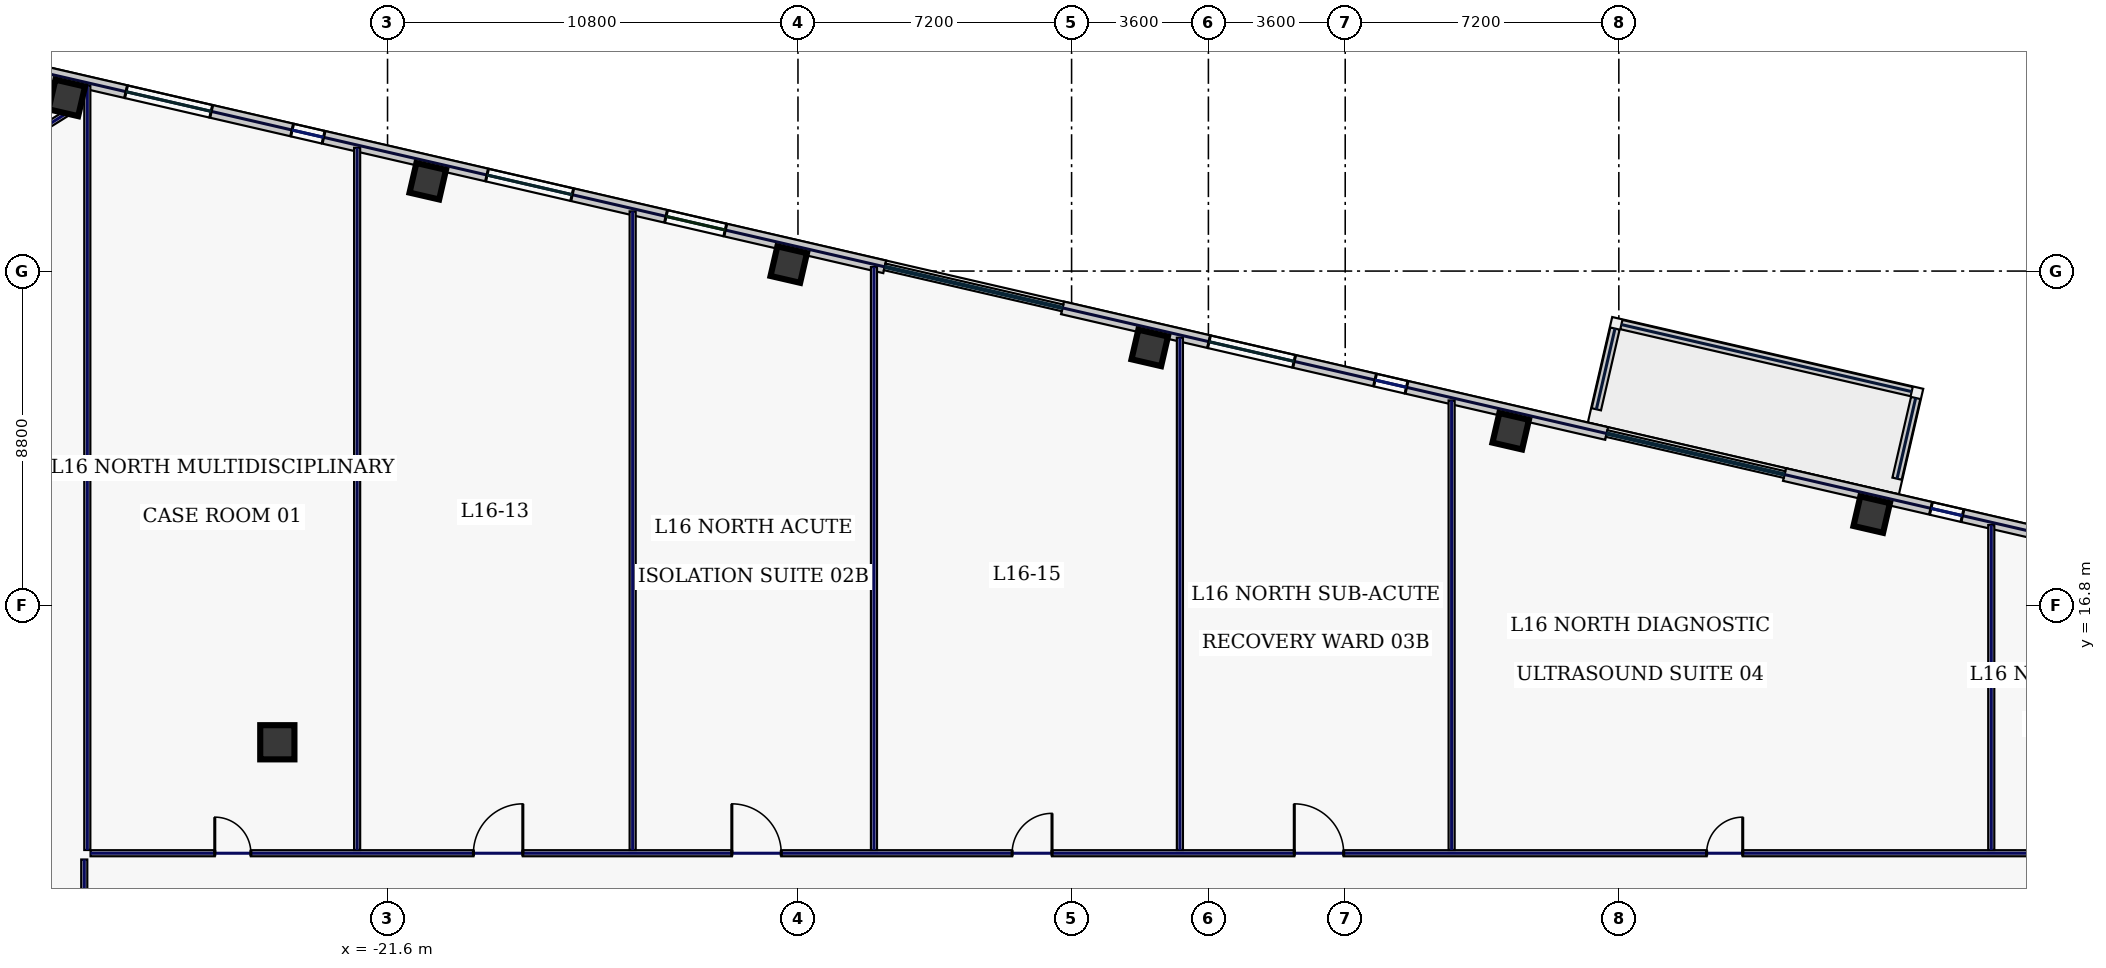
"""IFC4 building model, lengths in metres.
Left out: names, types, materials, properties, quantities, classifications, styles, units other than length and angle.
Written with IfcOpenShell. Run it as: python <this file> out.ifc"""

import sys

from ifc_helpers import new_model, si_unit, direction, frame, frame_2d, origin, origin_2d, place, context, subcontext, project, spatial, rectangle, hollow_rectangle, extrude, element, fill, save


model = new_model("IFC4")
c1 = context("Model", 3, precision=1e-05, world=origin(), true_north=direction((0.0, 1.0)))
c2 = subcontext(c1, "Body", "Model", "MODEL_VIEW")
j1 = project(units=[si_unit("LENGTHUNIT", "METRE"), si_unit("PLANEANGLEUNIT", "RADIAN")], contexts=[c1])
p1 = place(None, origin())
s1 = spatial("IfcSite", under=j1, at=p1, CompositionType="ELEMENT")
p2 = place(p1, origin())
s2 = spatial("IfcBuilding", under=s1, at=p2, CompositionType="ELEMENT")
p3 = place(p2, frame((0.0, 0.0, 75.4)))
s3 = spatial("IfcBuildingStorey", under=s2, at=p3, CompositionType="ELEMENT", Elevation=75.4)
p4 = place(p3, frame((-24.5, 13.2, 0.0), z_axis=(0.0, 0.0, 1.0), x_axis=(1.0, 0.0, 0.0)))
e1 = element("IfcColumn", 1, at=p4, inside=s3, PredefinedType="COLUMN", context=c2, shape_type="SweptSolid", body=[
    extrude(hollow_rectangle(XDim=0.9, YDim=0.9, WallThickness=0.04, at=origin_2d()), origin(), (0.0, 0.0, 1.0), 3.74),
])
for number, where, z_axis, x_axis in (
    (2, (17.454, 19.192, 0.0), (0.0, 0.0, 1.0), (0.974, -0.225, 0.0)),
    (3, (7.955, 21.385, 0.0), (0.0, 0.0, 1.0), (0.974, -0.225, 0.0)),
    (4, (-1.544, 23.578, 0.0), (0.0, 0.0, 1.0), (0.974, -0.225, 0.0)),
    (5, (-11.042, 25.771, 0.0), (0.0, 0.0, 1.0), (0.974, -0.225, 0.0)),
    (6, (-20.541, 27.964, 0.0), (0.0, 0.0, 1.0), (0.974, -0.225, 0.0)),
    (7, (-30.04, 30.156, 0.0), (0.0, 0.0, 1.0), (0.974, -0.225, 0.0)),
):
    element("IfcColumn", number, at=place(p3, frame(where, z_axis=z_axis, x_axis=x_axis)), inside=s3, PredefinedType="COLUMN", context=c2, shape_type="SweptSolid", body=[
        extrude(hollow_rectangle(XDim=0.8, YDim=0.8, WallThickness=0.036, at=origin_2d()), origin(), (0.0, 0.0, 1.0), 3.74),
    ])
p5 = place(p3, frame((10.208, 21.963, 0.0), z_axis=(0.0, 0.0, 1.0), x_axis=(0.224974004698, 0.974364765994, 0.0)))
e8 = element("IfcWall", 8, at=p5, inside=s3, PredefinedType="PARAPET", context=c2, shape_type="SweptSolid", body=[
    extrude(rectangle(XDim=2.18, YDim=0.25, at=frame_2d((1.09, 0.0))), origin(), (0.0, 0.0, 1.0), 1.15),
])
p6 = place(p3, frame((10.867, 24.192, 0.0), z_axis=(0.0, 0.0, 1.0), x_axis=(0.974362322181, -0.224984588615, 0.0)))
e9 = element("IfcWall", 9, at=p6, inside=s3, PredefinedType="PARAPET", context=c2, shape_type="SweptSolid", body=[
    extrude(rectangle(XDim=7.84, YDim=0.25, at=frame_2d((3.92, 0.0))), origin(), (0.0, 0.0, 1.0), 1.15),
])
p7 = place(p3, frame((18.611, 22.26, 0.0), z_axis=(0.0, 0.0, 1.0), x_axis=(-0.224867685436, -0.974389308258, 0.0)))
e10 = element("IfcWall", 10, at=p7, inside=s3, PredefinedType="PARAPET", context=c2, shape_type="SweptSolid", body=[
    extrude(rectangle(XDim=2.18, YDim=0.25, at=frame_2d((1.09, 0.0))), origin(), (0.0, 0.0, 1.0), 1.15),
])
p8 = place(p3, frame((37.229, 15.15, 0.0), z_axis=(0.0, 0.0, 1.0), x_axis=(-0.97436993772, 0.224951604723, 0.0)))
e11 = element("IfcWall", 11, at=p8, inside=s3, PredefinedType="STANDARD", context=c2, shape_type="SweptSolid", body=[
    extrude(rectangle(XDim=22.651, YDim=0.34, at=frame_2d((11.326, 0.0))), origin(), (0.0, 0.0, 1.0), 3.74),
])
p9 = place(p8, frame((17.845, 0.0, 0.77)))
e12 = element("IfcOpeningElement", 12, at=p9, cuts=e11, PredefinedType="OPENING", context=c2, shape_type="SweptSolid", body=[
    extrude(rectangle(XDim=0.85, YDim=1.85, at=frame_2d((0.425, 0.925))), frame((0.0, 0.18, 0.0), z_axis=(0.0, -1.0, 0.0), x_axis=(1.0, 0.0, 0.0)), (0.0, 0.0, 1.0), 0.36),
])
p10 = place(p8, frame((11.911, 0.0, 0.77)))
e13 = element("IfcOpeningElement", 13, at=p10, cuts=e11, PredefinedType="OPENING", context=c2, shape_type="SweptSolid", body=[
    extrude(rectangle(XDim=2.3, YDim=2.1, at=frame_2d((1.15, 1.05))), frame((0.0, 0.18, 0.0), z_axis=(0.0, -1.0, 0.0), x_axis=(1.0, 0.0, 0.0)), (0.0, 0.0, 1.0), 0.36),
])
p11 = place(p8, frame((2.162, 0.0, 0.77)))
e14 = element("IfcOpeningElement", 14, at=p11, cuts=e11, PredefinedType="OPENING", context=c2, shape_type="SweptSolid", body=[
    extrude(rectangle(XDim=2.3, YDim=2.1, at=frame_2d((1.15, 1.05))), frame((0.0, 0.18, 0.0), z_axis=(0.0, -1.0, 0.0), x_axis=(1.0, 0.0, 0.0)), (0.0, 0.0, 1.0), 0.36),
])
p12 = place(p3, frame((10.481, 21.325, 0.0), z_axis=(0.0, 0.0, 1.0), x_axis=(-0.974369353393, 0.2249541357, 0.0)))
e15 = element("IfcWall", 15, at=p12, inside=s3, PredefinedType="STANDARD", context=c2, shape_type="SweptSolid", body=[
    extrude(rectangle(XDim=14.697, YDim=0.34, at=frame_2d((7.349, 0.0))), origin(), (0.0, 0.0, 1.0), 3.74),
])
p13 = place(p12, frame((8.441, 0.0, 0.77)))
e16 = element("IfcOpeningElement", 16, at=p13, cuts=e15, PredefinedType="OPENING", context=c2, shape_type="SweptSolid", body=[
    extrude(rectangle(XDim=2.3, YDim=2.1, at=frame_2d((1.15, 1.05))), frame((0.0, 0.18, 0.0), z_axis=(0.0, -1.0, 0.0), x_axis=(1.0, 0.0, 0.0)), (0.0, 0.0, 1.0), 0.36),
])
p14 = place(p12, frame((5.406, 0.0, 0.77)))
e17 = element("IfcOpeningElement", 17, at=p14, cuts=e15, PredefinedType="OPENING", context=c2, shape_type="SweptSolid", body=[
    extrude(rectangle(XDim=0.85, YDim=1.85, at=frame_2d((0.425, 0.925))), frame((0.0, 0.18, 0.0), z_axis=(0.0, -1.0, 0.0), x_axis=(1.0, 0.0, 0.0)), (0.0, 0.0, 1.0), 0.36),
])
p15 = place(p3, frame((-8.517, 25.711, 0.0), z_axis=(0.0, 0.0, 1.0), x_axis=(-0.974372845456, 0.224939009598, 0.0)))
e18 = element("IfcWall", 18, at=p15, inside=s3, PredefinedType="STANDARD", context=c2, shape_type="SweptSolid", body=[
    extrude(rectangle(XDim=22.652, YDim=0.34, at=frame_2d((11.326, 0.0))), origin(), (0.0, 0.0, 1.0), 3.74),
])
p16 = place(p15, frame((18.189, 0.0, 0.77)))
e19 = element("IfcOpeningElement", 19, at=p16, cuts=e18, PredefinedType="OPENING", context=c2, shape_type="SweptSolid", body=[
    extrude(rectangle(XDim=2.3, YDim=2.1, at=frame_2d((1.15, 1.05))), frame((0.0, 0.18, 0.0), z_axis=(0.0, -1.0, 0.0), x_axis=(1.0, 0.0, 0.0)), (0.0, 0.0, 1.0), 0.36),
])
p17 = place(p15, frame((15.155, 0.0, 0.77)))
e20 = element("IfcOpeningElement", 20, at=p17, cuts=e18, PredefinedType="OPENING", context=c2, shape_type="SweptSolid", body=[
    extrude(rectangle(XDim=0.85, YDim=1.85, at=frame_2d((0.425, 0.925))), frame((0.0, 0.18, 0.0), z_axis=(0.0, -1.0, 0.0), x_axis=(1.0, 0.0, 0.0)), (0.0, 0.0, 1.0), 0.36),
])
p18 = place(p15, frame((8.441, 0.0, 0.77)))
e21 = element("IfcOpeningElement", 21, at=p18, cuts=e18, PredefinedType="OPENING", context=c2, shape_type="SweptSolid", body=[
    extrude(rectangle(XDim=2.3, YDim=2.1, at=frame_2d((1.15, 1.05))), frame((0.0, 0.18, 0.0), z_axis=(0.0, -1.0, 0.0), x_axis=(1.0, 0.0, 0.0)), (0.0, 0.0, 1.0), 0.36),
])
p19 = place(p15, frame((4.306, 0.0, 0.22)))
e22 = element("IfcOpeningElement", 22, at=p19, cuts=e18, PredefinedType="OPENING", context=c2, shape_type="SweptSolid", body=[
    extrude(rectangle(XDim=1.6, YDim=1.2, at=frame_2d((0.8, 0.6))), frame((0.0, 0.18, 0.0), z_axis=(0.0, -1.0, 0.0), x_axis=(1.0, 0.0, 0.0)), (0.0, 0.0, 1.0), 0.36),
])
p20 = place(p3, frame((-29.86, 29.868, 0.0), z_axis=(0.0, 0.0, 1.0), x_axis=(-0.848043064089, -0.529927317139, 0.0)))
e23 = element("IfcWall", 23, at=p20, inside=s3, PredefinedType="PARTITIONING", context=c2, shape_type="SweptSolid", body=[
    extrude(rectangle(XDim=7.354, YDim=0.16, at=frame_2d((3.677, 0.0))), origin(), (0.0, 0.0, 1.0), 3.74),
])
p21 = place(p3, frame((-29.58, -10.015, 0.0), z_axis=(0.0, 0.0, 1.0), x_axis=(0.0, 1.0, 0.0)))
e24 = element("IfcWall", 24, at=p21, inside=s3, PredefinedType="PARTITIONING", context=c2, shape_type="SweptSolid", body=[
    extrude(rectangle(XDim=20.13, YDim=0.16, at=frame_2d((10.065, 0.0))), origin(), (0.0, 0.0, 1.0), 3.74),
])
p22 = place(p21, frame((2.169, 0.0, 0.0)))
e25 = element("IfcOpeningElement", 25, at=p22, cuts=e24, PredefinedType="OPENING", context=c2, shape_type="SweptSolid", body=[
    extrude(rectangle(XDim=0.95, YDim=2.2, at=frame_2d((0.475, 1.1))), frame((0.0, 0.09, 0.0), z_axis=(0.0, -1.0, 0.0), x_axis=(1.0, 0.0, 0.0)), (0.0, 0.0, 1.0), 0.18),
])
p23 = place(p21, frame((6.4, 0.0, 0.0)))
e26 = element("IfcOpeningElement", 26, at=p23, cuts=e24, PredefinedType="OPENING", context=c2, shape_type="SweptSolid", body=[
    extrude(rectangle(XDim=0.95, YDim=2.2, at=frame_2d((0.475, 1.1))), frame((0.0, 0.09, 0.0), z_axis=(0.0, -1.0, 0.0), x_axis=(1.0, 0.0, 0.0)), (0.0, 0.0, 1.0), 0.18),
])
p24 = place(p21, frame((11.6, 0.0, 0.0)))
e27 = element("IfcOpeningElement", 27, at=p24, cuts=e24, PredefinedType="OPENING", context=c2, shape_type="SweptSolid", body=[
    extrude(rectangle(XDim=0.95, YDim=2.2, at=frame_2d((0.475, 1.1))), frame((0.0, 0.09, 0.0), z_axis=(0.0, -1.0, 0.0), x_axis=(1.0, 0.0, 0.0)), (0.0, 0.0, 1.0), 0.18),
])
p25 = place(p21, frame((17.131, 0.0, 0.0)))
e28 = element("IfcOpeningElement", 28, at=p25, cuts=e24, PredefinedType="OPENING", context=c2, shape_type="SweptSolid", body=[
    extrude(rectangle(XDim=0.95, YDim=2.2, at=frame_2d((0.475, 1.1))), frame((0.0, 0.09, 0.0), z_axis=(0.0, -1.0, 0.0), x_axis=(1.0, 0.0, 0.0)), (0.0, 0.0, 1.0), 0.18),
])
p26 = place(p3, frame((-29.415, 10.28, 0.0), z_axis=(0.0, 0.0, 1.0), x_axis=(1.0, 0.0, 0.0)))
e29 = element("IfcWall", 29, at=p26, inside=s3, PredefinedType="PARTITIONING", context=c2, shape_type="SweptSolid", body=[
    extrude(rectangle(XDim=58.83, YDim=0.16, at=frame_2d((29.415, 0.0))), origin(), (0.0, 0.0, 1.0), 3.74),
])
p27 = place(p26, frame((3.269, 0.0, 0.0)))
e30 = element("IfcOpeningElement", 30, at=p27, cuts=e29, PredefinedType="OPENING", context=c2, shape_type="SweptSolid", body=[
    extrude(rectangle(XDim=0.95, YDim=2.2, at=frame_2d((0.475, 1.1))), frame((0.0, 0.09, 0.0), z_axis=(0.0, -1.0, 0.0), x_axis=(1.0, 0.0, 0.0)), (0.0, 0.0, 1.0), 0.18),
])
p28 = place(p26, frame((10.075, 0.0, 0.0)))
e31 = element("IfcOpeningElement", 31, at=p28, cuts=e29, PredefinedType="OPENING", context=c2, shape_type="SweptSolid", body=[
    extrude(rectangle(XDim=1.3, YDim=2.2, at=frame_2d((0.65, 1.1))), frame((0.0, 0.09, 0.0), z_axis=(0.0, -1.0, 0.0), x_axis=(1.0, 0.0, 0.0)), (0.0, 0.0, 1.0), 0.18),
])
p29 = place(p26, frame((16.875, 0.0, 0.0)))
e32 = element("IfcOpeningElement", 32, at=p29, cuts=e29, PredefinedType="OPENING", context=c2, shape_type="SweptSolid", body=[
    extrude(rectangle(XDim=1.3, YDim=2.2, at=frame_2d((0.65, 1.1))), frame((0.0, 0.09, 0.0), z_axis=(0.0, -1.0, 0.0), x_axis=(1.0, 0.0, 0.0)), (0.0, 0.0, 1.0), 0.18),
])
p30 = place(p26, frame((24.25, 0.0, 0.0)))
e33 = element("IfcOpeningElement", 33, at=p30, cuts=e29, PredefinedType="OPENING", context=c2, shape_type="SweptSolid", body=[
    extrude(rectangle(XDim=1.05, YDim=2.2, at=frame_2d((0.525, 1.1))), frame((0.0, 0.09, 0.0), z_axis=(0.0, -1.0, 0.0), x_axis=(1.0, 0.0, 0.0)), (0.0, 0.0, 1.0), 0.18),
])
p31 = place(p26, frame((31.675, 0.0, 0.0)))
e34 = element("IfcOpeningElement", 34, at=p31, cuts=e29, PredefinedType="OPENING", context=c2, shape_type="SweptSolid", body=[
    extrude(rectangle(XDim=1.3, YDim=2.2, at=frame_2d((0.65, 1.1))), frame((0.0, 0.09, 0.0), z_axis=(0.0, -1.0, 0.0), x_axis=(1.0, 0.0, 0.0)), (0.0, 0.0, 1.0), 0.18),
])
p32 = place(p26, frame((42.525, 0.0, 0.0)))
e35 = element("IfcOpeningElement", 35, at=p32, cuts=e29, PredefinedType="OPENING", context=c2, shape_type="SweptSolid", body=[
    extrude(rectangle(XDim=0.95, YDim=2.2, at=frame_2d((0.475, 1.1))), frame((0.0, 0.09, 0.0), z_axis=(0.0, -1.0, 0.0), x_axis=(1.0, 0.0, 0.0)), (0.0, 0.0, 1.0), 0.18),
])
p33 = place(p26, frame((53.881, 0.0, 0.0)))
e36 = element("IfcOpeningElement", 36, at=p33, cuts=e29, PredefinedType="OPENING", context=c2, shape_type="SweptSolid", body=[
    extrude(rectangle(XDim=0.95, YDim=2.2, at=frame_2d((0.475, 1.1))), frame((0.0, 0.09, 0.0), z_axis=(0.0, -1.0, 0.0), x_axis=(1.0, 0.0, 0.0)), (0.0, 0.0, 1.0), 0.18),
])
p34 = place(p3, frame((-29.5, 10.365, 0.0), z_axis=(0.0, 0.0, 1.0), x_axis=(0.0, 1.0, 0.0)))
e37 = element("IfcWall", 37, at=p34, inside=s3, PredefinedType="PARTITIONING", context=c2, shape_type="SweptSolid", body=[
    extrude(rectangle(XDim=20.119, YDim=0.16, at=frame_2d((10.059, 0.0))), origin(), (0.0, 0.0, 1.0), 3.74),
])
p35 = place(p3, frame((-22.4, 10.365, 0.0), z_axis=(0.0, 0.0, 1.0), x_axis=(0.0, 1.0, 0.0)))
e38 = element("IfcWall", 38, at=p35, inside=s3, PredefinedType="PARTITIONING", context=c2, shape_type="SweptSolid", body=[
    extrude(rectangle(XDim=18.479, YDim=0.16, at=frame_2d((9.24, 0.0))), origin(), (0.0, 0.0, 1.0), 3.235),
])
p36 = place(p3, frame((-8.8, 10.365, 0.0), z_axis=(0.0, 0.0, 1.0), x_axis=(0.0, 1.0, 0.0)))
e39 = element("IfcWall", 39, at=p36, inside=s3, PredefinedType="PARTITIONING", context=c2, shape_type="SweptSolid", body=[
    extrude(rectangle(XDim=15.34, YDim=0.16, at=frame_2d((7.67, 0.0))), origin(), (0.0, 0.0, 1.0), 3.74),
])
p37 = place(p3, frame((6.4, 10.365, 0.0), z_axis=(0.0, 0.0, 1.0), x_axis=(0.0, 1.0, 0.0)))
e40 = element("IfcWall", 40, at=p37, inside=s3, PredefinedType="PARTITIONING", context=c2, shape_type="SweptSolid", body=[
    extrude(rectangle(XDim=11.83, YDim=0.16, at=frame_2d((5.915, 0.0))), origin(), (0.0, 0.0, 1.0), 3.74),
])
p38 = place(p3, frame((20.6, 10.365, 0.0), z_axis=(0.0, 0.0, 1.0), x_axis=(0.0, 1.0, 0.0)))
e41 = element("IfcWall", 41, at=p38, inside=s3, PredefinedType="PARTITIONING", context=c2, shape_type="SweptSolid", body=[
    extrude(rectangle(XDim=8.552, YDim=0.16, at=frame_2d((4.276, 0.0))), origin(), (0.0, 0.0, 1.0), 3.74),
])
p39 = place(p3, frame((-15.15, 10.365, 0.0), z_axis=(0.0, 0.0, 1.0), x_axis=(0.0, 1.0, 0.0)))
e42 = element("IfcWall", 42, at=p39, inside=s3, PredefinedType="PARTITIONING", context=c2, shape_type="SweptSolid", body=[
    extrude(rectangle(XDim=16.806, YDim=0.16, at=frame_2d((8.403, 0.0))), origin(), (0.0, 0.0, 1.0), 3.74),
])
p40 = place(p3, frame((-0.75, 10.365, 0.0), z_axis=(0.0, 0.0, 1.0), x_axis=(0.0, 1.0, 0.0)))
e43 = element("IfcWall", 43, at=p40, inside=s3, PredefinedType="PARTITIONING", context=c2, shape_type="SweptSolid", body=[
    extrude(rectangle(XDim=13.481, YDim=0.16, at=frame_2d((6.741, 0.0))), origin(), (0.0, 0.0, 1.0), 3.74),
])
p41 = place(p9, origin())
e44 = element("IfcWindow", 44, at=p41, inside=s3, PartitioningType="SINGLE_PANEL", PredefinedType="WINDOW", context=c2, shape_type="SweptSolid", body=[
    extrude(rectangle(XDim=0.85, YDim=1.85, at=frame_2d((0.425, 0.925))), frame((0.0, 0.03, 0.0), z_axis=(0.0, -1.0, 0.0), x_axis=(1.0, 0.0, 0.0)), (0.0, 0.0, 1.0), 0.06),
])
fill(e12, e44)
p42 = place(p13, origin())
e45 = element("IfcWindow", 45, at=p42, inside=s3, PartitioningType="SINGLE_PANEL", PredefinedType="WINDOW", context=c2, shape_type="SweptSolid", body=[
    extrude(rectangle(XDim=2.3, YDim=2.1, at=frame_2d((1.15, 1.05))), frame((0.0, 0.03, 0.0), z_axis=(0.0, -1.0, 0.0), x_axis=(1.0, 0.0, 0.0)), (0.0, 0.0, 1.0), 0.06),
])
fill(e16, e45)
p43 = place(p14, origin())
e46 = element("IfcWindow", 46, at=p43, inside=s3, PartitioningType="SINGLE_PANEL", PredefinedType="WINDOW", context=c2, shape_type="SweptSolid", body=[
    extrude(rectangle(XDim=0.85, YDim=1.85, at=frame_2d((0.425, 0.925))), frame((0.0, 0.03, 0.0), z_axis=(0.0, -1.0, 0.0), x_axis=(1.0, 0.0, 0.0)), (0.0, 0.0, 1.0), 0.06),
])
fill(e17, e46)
p44 = place(p16, origin())
e47 = element("IfcWindow", 47, at=p44, inside=s3, PartitioningType="SINGLE_PANEL", PredefinedType="WINDOW", context=c2, shape_type="SweptSolid", body=[
    extrude(rectangle(XDim=2.3, YDim=2.1, at=frame_2d((1.15, 1.05))), frame((0.0, 0.03, 0.0), z_axis=(0.0, -1.0, 0.0), x_axis=(1.0, 0.0, 0.0)), (0.0, 0.0, 1.0), 0.06),
])
fill(e19, e47)
p45 = place(p17, origin())
e48 = element("IfcWindow", 48, at=p45, inside=s3, PartitioningType="SINGLE_PANEL", PredefinedType="WINDOW", context=c2, shape_type="SweptSolid", body=[
    extrude(rectangle(XDim=0.85, YDim=1.85, at=frame_2d((0.425, 0.925))), frame((0.0, 0.03, 0.0), z_axis=(0.0, -1.0, 0.0), x_axis=(1.0, 0.0, 0.0)), (0.0, 0.0, 1.0), 0.06),
])
fill(e20, e48)
p46 = place(p18, origin())
e49 = element("IfcWindow", 49, at=p46, inside=s3, PartitioningType="SINGLE_PANEL", PredefinedType="WINDOW", context=c2, shape_type="SweptSolid", body=[
    extrude(rectangle(XDim=2.3, YDim=2.1, at=frame_2d((1.15, 1.05))), frame((0.0, 0.03, 0.0), z_axis=(0.0, -1.0, 0.0), x_axis=(1.0, 0.0, 0.0)), (0.0, 0.0, 1.0), 0.06),
])
fill(e21, e49)
p47 = place(p19, origin())
e50 = element("IfcWindow", 50, at=p47, inside=s3, PartitioningType="SINGLE_PANEL", PredefinedType="WINDOW", context=c2, shape_type="SweptSolid", body=[
    extrude(rectangle(XDim=1.6, YDim=1.2, at=frame_2d((0.8, 0.6))), frame((0.0, 0.03, 0.0), z_axis=(0.0, -1.0, 0.0), x_axis=(1.0, 0.0, 0.0)), (0.0, 0.0, 1.0), 0.06),
])
fill(e22, e50)
p48 = place(p27, origin())
e51 = element("IfcDoor", 51, at=p48, inside=s3, OperationType="SINGLE_SWING_LEFT", PredefinedType="DOOR", context=c2, shape_type="SweptSolid", body=[
    extrude(rectangle(XDim=0.95, YDim=2.2, at=frame_2d((0.475, 1.1))), frame((0.0, 0.025, 0.0), z_axis=(0.0, -1.0, 0.0), x_axis=(1.0, 0.0, 0.0)), (0.0, 0.0, 1.0), 0.05),
])
fill(e30, e51)
p49 = place(p28, origin())
e52 = element("IfcDoor", 52, at=p49, inside=s3, OperationType="SINGLE_SWING_RIGHT", PredefinedType="DOOR", context=c2, shape_type="SweptSolid", body=[
    extrude(rectangle(XDim=1.3, YDim=2.2, at=frame_2d((0.65, 1.1))), frame((0.0, 0.025, 0.0), z_axis=(0.0, -1.0, 0.0), x_axis=(1.0, 0.0, 0.0)), (0.0, 0.0, 1.0), 0.05),
])
fill(e31, e52)
p50 = place(p29, origin())
e53 = element("IfcDoor", 53, at=p50, inside=s3, OperationType="SINGLE_SWING_LEFT", PredefinedType="DOOR", context=c2, shape_type="SweptSolid", body=[
    extrude(rectangle(XDim=1.3, YDim=2.2, at=frame_2d((0.65, 1.1))), frame((0.0, 0.025, 0.0), z_axis=(0.0, -1.0, 0.0), x_axis=(1.0, 0.0, 0.0)), (0.0, 0.0, 1.0), 0.05),
])
fill(e32, e53)
p51 = place(p30, origin())
e54 = element("IfcDoor", 54, at=p51, inside=s3, OperationType="SINGLE_SWING_RIGHT", PredefinedType="DOOR", context=c2, shape_type="SweptSolid", body=[
    extrude(rectangle(XDim=1.05, YDim=2.2, at=frame_2d((0.525, 1.1))), frame((0.0, 0.025, 0.0), z_axis=(0.0, -1.0, 0.0), x_axis=(1.0, 0.0, 0.0)), (0.0, 0.0, 1.0), 0.05),
])
fill(e33, e54)
p52 = place(p31, origin())
e55 = element("IfcDoor", 55, at=p52, inside=s3, OperationType="SINGLE_SWING_LEFT", PredefinedType="DOOR", context=c2, shape_type="SweptSolid", body=[
    extrude(rectangle(XDim=1.3, YDim=2.2, at=frame_2d((0.65, 1.1))), frame((0.0, 0.025, 0.0), z_axis=(0.0, -1.0, 0.0), x_axis=(1.0, 0.0, 0.0)), (0.0, 0.0, 1.0), 0.05),
])
fill(e34, e55)
p53 = place(p32, origin())
e56 = element("IfcDoor", 56, at=p53, inside=s3, OperationType="SINGLE_SWING_RIGHT", PredefinedType="DOOR", context=c2, shape_type="SweptSolid", body=[
    extrude(rectangle(XDim=0.95, YDim=2.2, at=frame_2d((0.475, 1.1))), frame((0.0, 0.025, 0.0), z_axis=(0.0, -1.0, 0.0), x_axis=(1.0, 0.0, 0.0)), (0.0, 0.0, 1.0), 0.05),
])
fill(e35, e56)
save(model, sys.argv[1])
